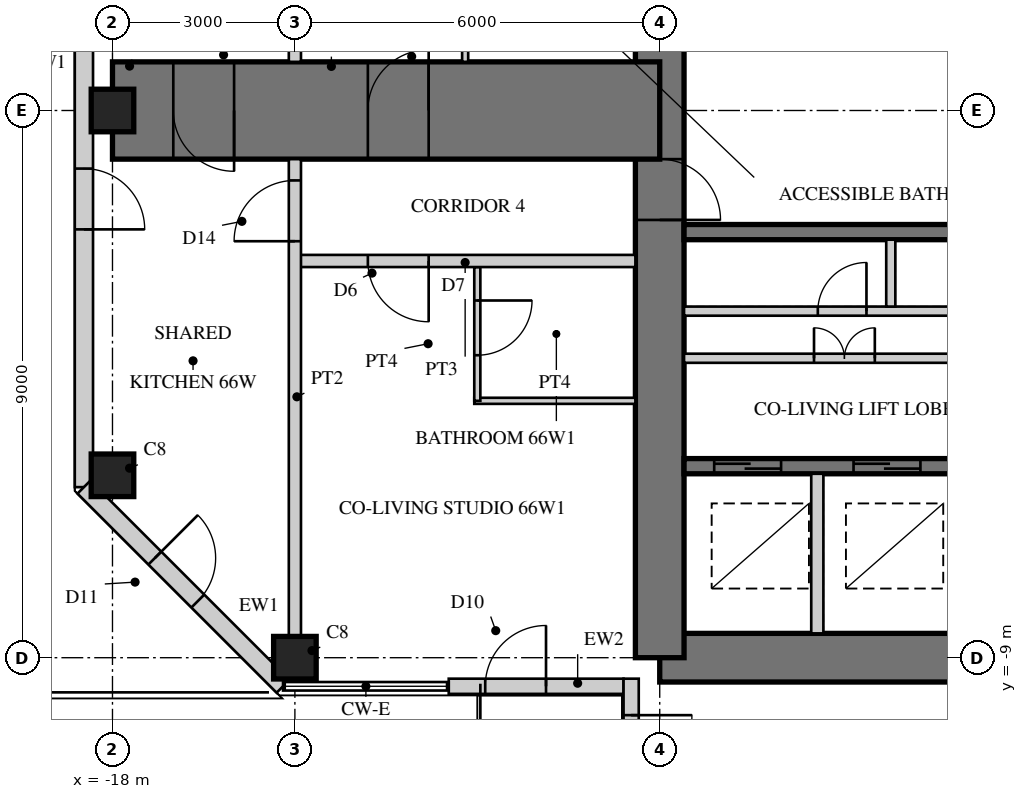
"""IFC4 building model, lengths in metres.
Left out: names, types, materials, properties, quantities, classifications, styles, units other than length and angle.
Written with IfcOpenShell. Run it as: python <this file> out.ifc"""

import sys

from ifc_helpers import new_model, si_unit, direction, frame, frame_2d, origin, origin_2d, place, context, subcontext, project, spatial, rectangle, hollow_rectangle, extrude, element, fill, save


model = new_model("IFC4")
c1 = context("Model", 3, precision=1e-05, world=origin(), true_north=direction((0.0, 1.0)))
c2 = subcontext(c1, "Body", "Model", "MODEL_VIEW")
j1 = project(units=[si_unit("LENGTHUNIT", "METRE"), si_unit("PLANEANGLEUNIT", "RADIAN")], contexts=[c1])
p1 = place(None, origin())
s1 = spatial("IfcSite", under=j1, at=p1, CompositionType="ELEMENT")
p2 = place(p1, origin())
s2 = spatial("IfcBuilding", under=s1, at=p2, CompositionType="ELEMENT")
p3 = place(p2, frame((0.0, 0.0, 257.7)))
s3 = spatial("IfcBuildingStorey", under=s2, at=p3, CompositionType="ELEMENT", Elevation=257.7)
p4 = place(p3, frame((-9.0, -9.0, 0.0), z_axis=(0.0, 0.0, 1.0), x_axis=(1.0, 0.0, 0.0)))
e1 = element("IfcWall", 1, at=p4, inside=s3, PredefinedType="SHEAR", context=c2, shape_type="SweptSolid", body=[
    extrude(rectangle(XDim=18.0, YDim=0.8, at=frame_2d((9.0, 0.0))), origin(), (0.0, 0.0, 1.0), 3.4),
])
p5 = place(p4, frame((9.8, 0.0, 0.0)))
e2 = element("IfcOpeningElement", 2, at=p5, cuts=e1, PredefinedType="OPENING", context=c2, shape_type="SweptSolid", body=[
    extrude(rectangle(XDim=1.0, YDim=2.4, at=frame_2d((0.5, 1.2))), frame((0.0, 0.41, 0.0), z_axis=(0.0, -1.0, 0.0), x_axis=(1.0, 0.0, 0.0)), (0.0, 0.0, 1.0), 0.82),
])
p6 = place(p3, frame((-9.0, 9.0, 0.0), z_axis=(0.0, 0.0, 1.0), x_axis=(0.0, -1.0, 0.0)))
e3 = element("IfcWall", 3, at=p6, inside=s3, PredefinedType="SHEAR", context=c2, shape_type="SweptSolid", body=[
    extrude(rectangle(XDim=18.0, YDim=0.8, at=frame_2d((9.0, 0.0))), origin(), (0.0, 0.0, 1.0), 3.4),
])
p7 = place(p6, frame((9.8, 0.0, 0.0)))
e4 = element("IfcOpeningElement", 4, at=p7, cuts=e3, PredefinedType="OPENING", context=c2, shape_type="SweptSolid", body=[
    extrude(rectangle(XDim=1.0, YDim=2.4, at=frame_2d((0.5, 1.2))), frame((0.0, 0.41, 0.0), z_axis=(0.0, -1.0, 0.0), x_axis=(1.0, 0.0, 0.0)), (0.0, 0.0, 1.0), 0.82),
])
p8 = place(p3, frame((-1.925, -2.0, 0.0), z_axis=(0.0, 0.0, 1.0), x_axis=(-1.0, 0.0, 0.0)))
e5 = element("IfcWall", 5, at=p8, inside=s3, PredefinedType="SHEAR", context=c2, shape_type="SweptSolid", body=[
    extrude(rectangle(XDim=6.675, YDim=0.25, at=frame_2d((3.337, 0.0))), origin(), (0.0, 0.0, 1.0), 3.4),
])
p9 = place(p3, frame((-1.925, -5.85, 0.0), z_axis=(0.0, 0.0, 1.0), x_axis=(-1.0, 0.0, 0.0)))
e6 = element("IfcWall", 6, at=p9, inside=s3, PredefinedType="SHEAR", context=c2, shape_type="SweptSolid", body=[
    extrude(rectangle(XDim=6.675, YDim=0.25, at=frame_2d((3.337, 0.0))), origin(), (0.0, 0.0, 1.0), 3.4),
])
p10 = place(p9, frame((0.496, 0.0, 0.0)))
e7 = element("IfcOpeningElement", 7, at=p10, cuts=e6, PredefinedType="OPENING", context=c2, shape_type="SweptSolid", body=[
    extrude(rectangle(XDim=1.1, YDim=2.2, at=frame_2d((0.55, 1.1))), frame((0.0, 0.135, 0.0), z_axis=(0.0, -1.0, 0.0), x_axis=(1.0, 0.0, 0.0)), (0.0, 0.0, 1.0), 0.27),
])
p11 = place(p9, frame((2.788, 0.0, 0.0)))
e8 = element("IfcOpeningElement", 8, at=p11, cuts=e6, PredefinedType="OPENING", context=c2, shape_type="SweptSolid", body=[
    extrude(rectangle(XDim=1.1, YDim=2.2, at=frame_2d((0.55, 1.1))), frame((0.0, 0.135, 0.0), z_axis=(0.0, -1.0, 0.0), x_axis=(1.0, 0.0, 0.0)), (0.0, 0.0, 1.0), 0.27),
])
p12 = place(p9, frame((5.079, 0.0, 0.0)))
e9 = element("IfcOpeningElement", 9, at=p12, cuts=e6, PredefinedType="OPENING", context=c2, shape_type="SweptSolid", body=[
    extrude(rectangle(XDim=1.1, YDim=2.2, at=frame_2d((0.55, 1.1))), frame((0.0, 0.135, 0.0), z_axis=(0.0, -1.0, 0.0), x_axis=(1.0, 0.0, 0.0)), (0.0, 0.0, 1.0), 0.27),
])
p13 = place(p3, frame((-1.925, -3.3, 0.0), z_axis=(0.0, 0.0, 1.0), x_axis=(-1.0, 0.0, 0.0)))
e10 = element("IfcWall", 10, at=p13, inside=s3, PredefinedType="PARTITIONING", context=c2, shape_type="SweptSolid", body=[
    extrude(rectangle(XDim=6.675, YDim=0.15, at=frame_2d((3.337, 0.0))), origin(), (0.0, 0.0, 1.0), 3.4),
])
p14 = place(p13, frame((0.075, 0.0, 0.0)))
e11 = element("IfcOpeningElement", 11, at=p14, cuts=e10, PredefinedType="OPENING", context=c2, shape_type="SweptSolid", body=[
    extrude(rectangle(XDim=0.8, YDim=2.1, at=frame_2d((0.4, 1.05))), frame((0.0, 0.085, 0.0), z_axis=(0.0, -1.0, 0.0), x_axis=(1.0, 0.0, 0.0)), (0.0, 0.0, 1.0), 0.17),
])
p15 = place(p13, frame((3.675, 0.0, 0.0)))
e12 = element("IfcOpeningElement", 12, at=p15, cuts=e10, PredefinedType="OPENING", context=c2, shape_type="SweptSolid", body=[
    extrude(rectangle(XDim=0.8, YDim=2.1, at=frame_2d((0.4, 1.05))), frame((0.0, 0.085, 0.0), z_axis=(0.0, -1.0, 0.0), x_axis=(1.0, 0.0, 0.0)), (0.0, 0.0, 1.0), 0.17),
])
p16 = place(p3, frame((-5.2, -2.125, 0.0), z_axis=(0.0, 0.0, 1.0), x_axis=(0.0, -1.0, 0.0)))
e13 = element("IfcWall", 13, at=p16, inside=s3, PredefinedType="PARTITIONING", context=c2, shape_type="SweptSolid", body=[
    extrude(rectangle(XDim=1.1, YDim=0.15, at=frame_2d((0.55, 0.0))), origin(), (0.0, 0.0, 1.0), 3.4),
])
p17 = place(p3, frame((-6.408, -5.975, 0.0), z_axis=(0.0, 0.0, 1.0), x_axis=(0.0, -1.0, 0.0)))
e14 = element("IfcWall", 14, at=p17, inside=s3, PredefinedType="PARTITIONING", context=c2, shape_type="SweptSolid", body=[
    extrude(rectangle(XDim=2.625, YDim=0.2, at=frame_2d((1.312, 0.0))), origin(), (0.0, 0.0, 1.0), 3.4),
])
p18 = place(p3, frame((-9.0, 0.0, 0.0), z_axis=(0.0, 0.0, 1.0), x_axis=(-1.0, 0.0, 0.0)))
e15 = element("IfcWall", 15, at=p18, inside=s3, PredefinedType="SHEAR", context=c2, shape_type="SweptSolid", body=[
    extrude(rectangle(XDim=9.0, YDim=1.6, at=frame_2d((4.5, 0.0))), origin(), (0.0, 0.0, 1.0), 3.4),
])
p19 = place(p18, frame((3.8, 0.0, 0.0)))
e16 = element("IfcOpeningElement", 16, at=p19, cuts=e15, PredefinedType="OPENING", context=c2, shape_type="SweptSolid", body=[
    extrude(rectangle(XDim=1.0, YDim=2.15, at=frame_2d((0.5, 1.075))), frame((0.0, 0.81, 0.0), z_axis=(0.0, -1.0, 0.0), x_axis=(1.0, 0.0, 0.0)), (0.0, 0.0, 1.0), 1.62),
])
p20 = place(p18, frame((7.0, 0.0, 0.0)))
e17 = element("IfcOpeningElement", 17, at=p20, cuts=e15, PredefinedType="OPENING", context=c2, shape_type="SweptSolid", body=[
    extrude(rectangle(XDim=1.0, YDim=2.2, at=frame_2d((0.5, 1.1))), frame((0.0, 0.81, 0.0), z_axis=(0.0, -1.0, 0.0), x_axis=(1.0, 0.0, 0.0)), (0.0, 0.0, 1.0), 1.62),
])
for number, where, z_axis, x_axis in (
    (18, (-15.0, -9.0, 0.0), (0.0, 0.0, 1.0), (1.0, 0.0, 0.0)),
    (19, (-18.0, 0.0, 0.0), (0.0, 0.0, 1.0), (1.0, 0.0, 0.0)),
    (20, (-18.0, -6.0, 0.0), (0.0, 0.0, 1.0), (1.0, 0.0, 0.0)),
):
    element("IfcColumn", number, at=place(p3, frame(where, z_axis=z_axis, x_axis=x_axis)), inside=s3, PredefinedType="COLUMN", context=c2, shape_type="SweptSolid", body=[
        extrude(rectangle(XDim=0.7, YDim=0.7, at=origin_2d()), origin(), (0.0, 0.0, 1.0), 3.4),
    ])
p21 = place(p3, frame((-18.47, 6.195, 0.0), z_axis=(0.0, 0.0, 1.0), x_axis=(0.0, -1.0, 0.0)))
e21 = element("IfcWall", 21, at=p21, inside=s3, PredefinedType="SOLIDWALL", context=c2, shape_type="SweptSolid", body=[
    extrude(rectangle(XDim=12.389, YDim=0.3, at=frame_2d((6.195, 0.0))), origin(), (0.0, 0.0, 1.0), 3.22),
])
p22 = place(p21, frame((7.15, 0.0, 0.0)))
e22 = element("IfcOpeningElement", 22, at=p22, cuts=e21, PredefinedType="OPENING", context=c2, shape_type="SweptSolid", body=[
    extrude(rectangle(XDim=1.0, YDim=2.4, at=frame_2d((0.5, 1.2))), frame((0.0, 0.16, 0.0), z_axis=(0.0, -1.0, 0.0), x_axis=(1.0, 0.0, 0.0)), (0.0, 0.0, 1.0), 0.32),
])
p23 = place(p3, frame((-18.47, -6.195, 0.0), z_axis=(0.0, 0.0, 1.0), x_axis=(0.707106781187, -0.707106781187, 0.0)))
e23 = element("IfcWall", 23, at=p23, inside=s3, PredefinedType="SOLIDWALL", context=c2, shape_type="SweptSolid", body=[
    extrude(rectangle(XDim=4.632, YDim=0.3, at=frame_2d((2.316, 0.0))), origin(), (0.0, 0.0, 1.0), 3.22),
])
p24 = place(p23, frame((1.65, 0.0, 0.0)))
e24 = element("IfcOpeningElement", 24, at=p24, cuts=e23, PredefinedType="OPENING", context=c2, shape_type="SweptSolid", body=[
    extrude(rectangle(XDim=1.0, YDim=2.4, at=frame_2d((0.5, 1.2))), frame((0.0, 0.16, 0.0), z_axis=(0.0, -1.0, 0.0), x_axis=(1.0, 0.0, 0.0)), (0.0, 0.0, 1.0), 0.32),
])
p25 = place(p3, frame((-12.47, -9.47, 0.0), z_axis=(0.0, 0.0, 1.0), x_axis=(1.0, 0.0, 0.0)))
e25 = element("IfcWall", 25, at=p25, inside=s3, PredefinedType="SOLIDWALL", context=c2, shape_type="SweptSolid", body=[
    extrude(rectangle(XDim=2.875, YDim=0.25, at=frame_2d((1.438, 0.0))), origin(), (0.0, 0.0, 1.0), 3.22),
])
p26 = place(p25, frame((0.6, 0.0, 0.0)))
e26 = element("IfcOpeningElement", 26, at=p26, cuts=e25, PredefinedType="OPENING", context=c2, shape_type="SweptSolid", body=[
    extrude(rectangle(XDim=1.0, YDim=2.2, at=frame_2d((0.5, 1.1))), frame((0.0, 0.135, 0.0), z_axis=(0.0, -1.0, 0.0), x_axis=(1.0, 0.0, 0.0)), (0.0, 0.0, 1.0), 0.27),
])
p27 = place(p3, frame((-9.47, -9.345, 0.0), z_axis=(0.0, 0.0, 1.0), x_axis=(0.0, -1.0, 0.0)))
e27 = element("IfcWall", 27, at=p27, inside=s3, PredefinedType="SOLIDWALL", context=c2, shape_type="SweptSolid", body=[
    extrude(rectangle(XDim=3.125, YDim=0.25, at=frame_2d((1.562, 0.0))), origin(), (0.0, 0.0, 1.0), 3.22),
])
p28 = place(p27, frame((0.6, 0.0, 0.0)))
e28 = element("IfcOpeningElement", 28, at=p28, cuts=e27, PredefinedType="OPENING", context=c2, shape_type="SweptSolid", body=[
    extrude(rectangle(XDim=1.0, YDim=2.2, at=frame_2d((0.5, 1.1))), frame((0.0, 0.135, 0.0), z_axis=(0.0, -1.0, 0.0), x_axis=(1.0, 0.0, 0.0)), (0.0, 0.0, 1.0), 0.27),
])
p29 = place(p3, frame((-3.325, -4.075, 0.0), z_axis=(0.0, 0.0, 1.0), x_axis=(-1.0, 0.0, 0.0)))
e29 = element("IfcWall", 29, at=p29, inside=s3, PredefinedType="PARTITIONING", context=c2, shape_type="SweptSolid", body=[
    extrude(rectangle(XDim=5.275, YDim=0.15, at=frame_2d((2.638, 0.0))), origin(), (0.0, 0.0, 1.0), 3.22),
])
p30 = place(p29, frame((2.137, 0.0, 0.0)))
e30 = element("IfcOpeningElement", 30, at=p30, cuts=e29, PredefinedType="OPENING", context=c2, shape_type="SweptSolid", body=[
    extrude(rectangle(XDim=1.0, YDim=2.1, at=frame_2d((0.5, 1.05))), frame((0.0, 0.085, 0.0), z_axis=(0.0, -1.0, 0.0), x_axis=(1.0, 0.0, 0.0)), (0.0, 0.0, 1.0), 0.17),
])
p31 = place(p3, frame((-9.4, -4.775, 0.0), z_axis=(0.0, 0.0, 1.0), x_axis=(-1.0, 0.0, 0.0)))
e31 = element("IfcWall", 31, at=p31, inside=s3, PredefinedType="PARTITIONING", context=c2, shape_type="SweptSolid", body=[
    extrude(rectangle(XDim=2.65, YDim=0.1, at=frame_2d((1.325, 0.0))), origin(), (0.0, 0.0, 1.0), 3.22),
])
p32 = place(p3, frame((-12.0, -2.575, 0.0), z_axis=(0.0, 0.0, 1.0), x_axis=(0.0, -1.0, 0.0)))
e32 = element("IfcWall", 32, at=p32, inside=s3, PredefinedType="PARTITIONING", context=c2, shape_type="SweptSolid", body=[
    extrude(rectangle(XDim=2.2, YDim=0.1, at=frame_2d((1.1, 0.0))), origin(), (0.0, 0.0, 1.0), 3.22),
])
p33 = place(p32, frame((0.55, 0.0, 0.0)))
e33 = element("IfcOpeningElement", 33, at=p33, cuts=e32, PredefinedType="OPENING", context=c2, shape_type="SweptSolid", body=[
    extrude(rectangle(XDim=0.9, YDim=2.1, at=frame_2d((0.45, 1.05))), frame((0.0, 0.06, 0.0), z_axis=(0.0, -1.0, 0.0), x_axis=(1.0, 0.0, 0.0)), (0.0, 0.0, 1.0), 0.12),
])
p34 = place(p3, frame((-12.2, 3.4, 0.0), z_axis=(0.0, 0.0, 1.0), x_axis=(0.0, -1.0, 0.0)))
e34 = element("IfcWall", 34, at=p34, inside=s3, PredefinedType="PARTITIONING", context=c2, shape_type="SweptSolid", body=[
    extrude(rectangle(XDim=2.6, YDim=0.1, at=frame_2d((1.3, 0.0))), origin(), (0.0, 0.0, 1.0), 3.22),
])
p35 = place(p34, frame((0.55, 0.0, 0.0)))
e35 = element("IfcOpeningElement", 35, at=p35, cuts=e34, PredefinedType="OPENING", context=c2, shape_type="SweptSolid", body=[
    extrude(rectangle(XDim=0.9, YDim=2.1, at=frame_2d((0.45, 1.05))), frame((0.0, 0.06, 0.0), z_axis=(0.0, -1.0, 0.0), x_axis=(1.0, 0.0, 0.0)), (0.0, 0.0, 1.0), 0.12),
])
p36 = place(p3, frame((-9.4, -2.475, 0.0), z_axis=(0.0, 0.0, 1.0), x_axis=(-1.0, 0.0, 0.0)))
e36 = element("IfcWall", 36, at=p36, inside=s3, PredefinedType="SOLIDWALL", context=c2, shape_type="SweptSolid", body=[
    extrude(rectangle(XDim=5.6, YDim=0.2, at=frame_2d((2.8, 0.0))), origin(), (0.0, 0.0, 1.0), 3.22),
])
p37 = place(p36, frame((3.4, 0.0, 0.0)))
e37 = element("IfcOpeningElement", 37, at=p37, cuts=e36, PredefinedType="OPENING", context=c2, shape_type="SweptSolid", body=[
    extrude(rectangle(XDim=1.0, YDim=2.15, at=frame_2d((0.5, 1.075))), frame((0.0, 0.11, 0.0), z_axis=(0.0, -1.0, 0.0), x_axis=(1.0, 0.0, 0.0)), (0.0, 0.0, 1.0), 0.22),
])
p38 = place(p3, frame((-15.0, 8.65, 0.0), z_axis=(0.0, 0.0, 1.0), x_axis=(0.0, -1.0, 0.0)))
e38 = element("IfcWall", 38, at=p38, inside=s3, PredefinedType="SOLIDWALL", context=c2, shape_type="SweptSolid", body=[
    extrude(rectangle(XDim=7.85, YDim=0.2, at=frame_2d((3.925, 0.0))), origin(), (0.0, 0.0, 1.0), 2.52),
])
p39 = place(p3, frame((-15.0, -0.8, 0.0), z_axis=(0.0, 0.0, 1.0), x_axis=(0.0, -1.0, 0.0)))
e39 = element("IfcWall", 39, at=p39, inside=s3, PredefinedType="SOLIDWALL", context=c2, shape_type="SweptSolid", body=[
    extrude(rectangle(XDim=7.85, YDim=0.2, at=frame_2d((3.925, 0.0))), origin(), (0.0, 0.0, 1.0), 2.52),
])
p40 = place(p39, frame((0.35, 0.0, 0.0)))
e40 = element("IfcOpeningElement", 40, at=p40, cuts=e39, PredefinedType="OPENING", context=c2, shape_type="SweptSolid", body=[
    extrude(rectangle(XDim=1.0, YDim=2.2, at=frame_2d((0.5, 1.1))), frame((0.0, 0.11, 0.0), z_axis=(0.0, -1.0, 0.0), x_axis=(1.0, 0.0, 0.0)), (0.0, 0.0, 1.0), 0.22),
])
p41 = place(p22, origin())
e41 = element("IfcDoor", 41, at=p41, inside=s3, OperationType="SINGLE_SWING_RIGHT", PredefinedType="DOOR", context=c2, shape_type="SweptSolid", body=[
    extrude(hollow_rectangle(XDim=1.0, YDim=2.4, WallThickness=0.06, at=frame_2d((0.5, 1.2))), frame((0.0, 0.025, 0.0), z_axis=(0.0, -1.0, 0.0), x_axis=(1.0, 0.0, 0.0)), (0.0, 0.0, 1.0), 0.05),
    extrude(rectangle(XDim=0.879, YDim=2.279, at=frame_2d((0.5, 1.2))), frame((0.0, 0.025, 0.0), z_axis=(0.0, -1.0, 0.0), x_axis=(1.0, 0.0, 0.0)), (0.0, 0.0, 1.0), 0.05),
])
fill(e22, e41)
p42 = place(p24, origin())
e42 = element("IfcDoor", 42, at=p42, inside=s3, OperationType="SINGLE_SWING_LEFT", PredefinedType="DOOR", context=c2, shape_type="SweptSolid", body=[
    extrude(hollow_rectangle(XDim=1.0, YDim=2.4, WallThickness=0.06, at=frame_2d((0.5, 1.2))), frame((0.0, 0.025, 0.0), z_axis=(0.0, -1.0, 0.0), x_axis=(1.0, 0.0, 0.0)), (0.0, 0.0, 1.0), 0.05),
    extrude(rectangle(XDim=0.879, YDim=2.279, at=frame_2d((0.5, 1.2))), frame((0.0, 0.025, 0.0), z_axis=(0.0, -1.0, 0.0), x_axis=(1.0, 0.0, 0.0)), (0.0, 0.0, 1.0), 0.05),
])
fill(e24, e42)
p43 = place(p26, origin())
e43 = element("IfcDoor", 43, at=p43, inside=s3, OperationType="SINGLE_SWING_RIGHT", PredefinedType="DOOR", context=c2, shape_type="SweptSolid", body=[
    extrude(hollow_rectangle(XDim=1.0, YDim=2.2, WallThickness=0.06, at=frame_2d((0.5, 1.1))), frame((0.0, 0.025, 0.0), z_axis=(0.0, -1.0, 0.0), x_axis=(1.0, 0.0, 0.0)), (0.0, 0.0, 1.0), 0.05),
    extrude(rectangle(XDim=0.879, YDim=2.079, at=frame_2d((0.5, 1.1))), frame((0.0, 0.025, 0.0), z_axis=(0.0, -1.0, 0.0), x_axis=(1.0, 0.0, 0.0)), (0.0, 0.0, 1.0), 0.05),
])
fill(e26, e43)
p44 = place(p28, origin())
e44 = element("IfcDoor", 44, at=p44, inside=s3, OperationType="SINGLE_SWING_LEFT", PredefinedType="DOOR", context=c2, shape_type="SweptSolid", body=[
    extrude(hollow_rectangle(XDim=1.0, YDim=2.2, WallThickness=0.06, at=frame_2d((0.5, 1.1))), frame((0.0, 0.025, 0.0), z_axis=(0.0, -1.0, 0.0), x_axis=(1.0, 0.0, 0.0)), (0.0, 0.0, 1.0), 0.05),
    extrude(rectangle(XDim=0.879, YDim=2.079, at=frame_2d((0.5, 1.1))), frame((0.0, 0.025, 0.0), z_axis=(0.0, -1.0, 0.0), x_axis=(1.0, 0.0, 0.0)), (0.0, 0.0, 1.0), 0.05),
])
fill(e28, e44)
p45 = place(p30, frame((1.0, 0.0, 0.0), z_axis=(0.0, 0.0, 1.0), x_axis=(-1.0, 0.0, 0.0)))
e45 = element("IfcDoor", 45, at=p45, inside=s3, OperationType="DOUBLE_DOOR_SINGLE_SWING", PredefinedType="DOOR", context=c2, shape_type="SweptSolid", body=[
    extrude(rectangle(XDim=1.0, YDim=2.1, at=frame_2d((0.5, 1.05))), frame((0.0, 0.025, 0.0), z_axis=(0.0, -1.0, 0.0), x_axis=(1.0, 0.0, 0.0)), (0.0, 0.0, 1.0), 0.05),
])
fill(e30, e45)
p46 = place(p33, origin())
e46 = element("IfcDoor", 46, at=p46, inside=s3, OperationType="SINGLE_SWING_LEFT", PredefinedType="DOOR", context=c2, shape_type="SweptSolid", body=[
    extrude(rectangle(XDim=0.9, YDim=2.1, at=frame_2d((0.45, 1.05))), frame((0.0, 0.025, 0.0), z_axis=(0.0, -1.0, 0.0), x_axis=(1.0, 0.0, 0.0)), (0.0, 0.0, 1.0), 0.05),
])
fill(e33, e46)
p47 = place(p37, origin())
e47 = element("IfcDoor", 47, at=p47, inside=s3, OperationType="SINGLE_SWING_LEFT", PredefinedType="DOOR", context=c2, shape_type="SweptSolid", body=[
    extrude(rectangle(XDim=1.0, YDim=2.15, at=frame_2d((0.5, 1.075))), frame((0.0, 0.025, 0.0), z_axis=(0.0, -1.0, 0.0), x_axis=(1.0, 0.0, 0.0)), (0.0, 0.0, 1.0), 0.05),
])
fill(e37, e47)
p48 = place(p40, frame((1.0, 0.0, 0.0), z_axis=(0.0, 0.0, 1.0), x_axis=(-1.0, 0.0, 0.0)))
e48 = element("IfcDoor", 48, at=p48, inside=s3, OperationType="SINGLE_SWING_LEFT", PredefinedType="DOOR", context=c2, shape_type="SweptSolid", body=[
    extrude(rectangle(XDim=1.0, YDim=2.2, at=frame_2d((0.5, 1.1))), frame((0.0, 0.025, 0.0), z_axis=(0.0, -1.0, 0.0), x_axis=(1.0, 0.0, 0.0)), (0.0, 0.0, 1.0), 0.05),
])
fill(e40, e48)
p49 = place(p19, frame((1.0, 0.0, 0.0), z_axis=(0.0, 0.0, 1.0), x_axis=(-1.0, 0.0, 0.0)))
e49 = element("IfcDoor", 49, at=p49, inside=s3, OperationType="SINGLE_SWING_RIGHT", PredefinedType="DOOR", context=c2, shape_type="SweptSolid", body=[
    extrude(rectangle(XDim=1.0, YDim=2.15, at=frame_2d((0.5, 1.075))), frame((0.0, 0.025, 0.0), z_axis=(0.0, -1.0, 0.0), x_axis=(1.0, 0.0, 0.0)), (0.0, 0.0, 1.0), 0.05),
])
fill(e16, e49)
p50 = place(p20, origin())
e50 = element("IfcDoor", 50, at=p50, inside=s3, OperationType="SINGLE_SWING_LEFT", PredefinedType="DOOR", context=c2, shape_type="SweptSolid", body=[
    extrude(rectangle(XDim=1.0, YDim=2.2, at=frame_2d((0.5, 1.1))), frame((0.0, 0.025, 0.0), z_axis=(0.0, -1.0, 0.0), x_axis=(1.0, 0.0, 0.0)), (0.0, 0.0, 1.0), 0.05),
])
fill(e17, e50)
p51 = place(p7, origin())
e51 = element("IfcDoor", 51, at=p51, inside=s3, OperationType="SINGLE_SWING_RIGHT", PredefinedType="DOOR", context=c2, shape_type="SweptSolid", body=[
    extrude(rectangle(XDim=1.0, YDim=2.4, at=frame_2d((0.5, 1.2))), frame((0.0, 0.055, 0.0), z_axis=(0.0, -1.0, 0.0), x_axis=(1.0, 0.0, 0.0)), (0.0, 0.0, 1.0), 0.05),
])
fill(e4, e51)
p52 = place(p11, origin())
e52 = element("IfcDoor", 52, at=p52, inside=s3, OperationType="DOUBLE_DOOR_SLIDING", PredefinedType="DOOR", context=c2, shape_type="SweptSolid", body=[
    extrude(rectangle(XDim=1.1, YDim=2.2, at=frame_2d((0.55, 1.1))), frame((0.0, 0.025, 0.0), z_axis=(0.0, -1.0, 0.0), x_axis=(1.0, 0.0, 0.0)), (0.0, 0.0, 1.0), 0.05),
])
fill(e8, e52)
p53 = place(p12, origin())
e53 = element("IfcDoor", 53, at=p53, inside=s3, OperationType="DOUBLE_DOOR_SLIDING", PredefinedType="DOOR", context=c2, shape_type="SweptSolid", body=[
    extrude(rectangle(XDim=1.1, YDim=2.2, at=frame_2d((0.55, 1.1))), frame((0.0, 0.025, 0.0), z_axis=(0.0, -1.0, 0.0), x_axis=(1.0, 0.0, 0.0)), (0.0, 0.0, 1.0), 0.05),
])
fill(e9, e53)
p54 = place(p15, frame((0.8, 0.0, 0.0), z_axis=(0.0, 0.0, 1.0), x_axis=(-1.0, 0.0, 0.0)))
e54 = element("IfcDoor", 54, at=p54, inside=s3, OperationType="SINGLE_SWING_RIGHT", PredefinedType="DOOR", context=c2, shape_type="SweptSolid", body=[
    extrude(rectangle(XDim=0.8, YDim=2.1, at=frame_2d((0.4, 1.05))), frame((0.0, 0.025, 0.0), z_axis=(0.0, -1.0, 0.0), x_axis=(1.0, 0.0, 0.0)), (0.0, 0.0, 1.0), 0.05),
])
fill(e12, e54)
save(model, sys.argv[1])
